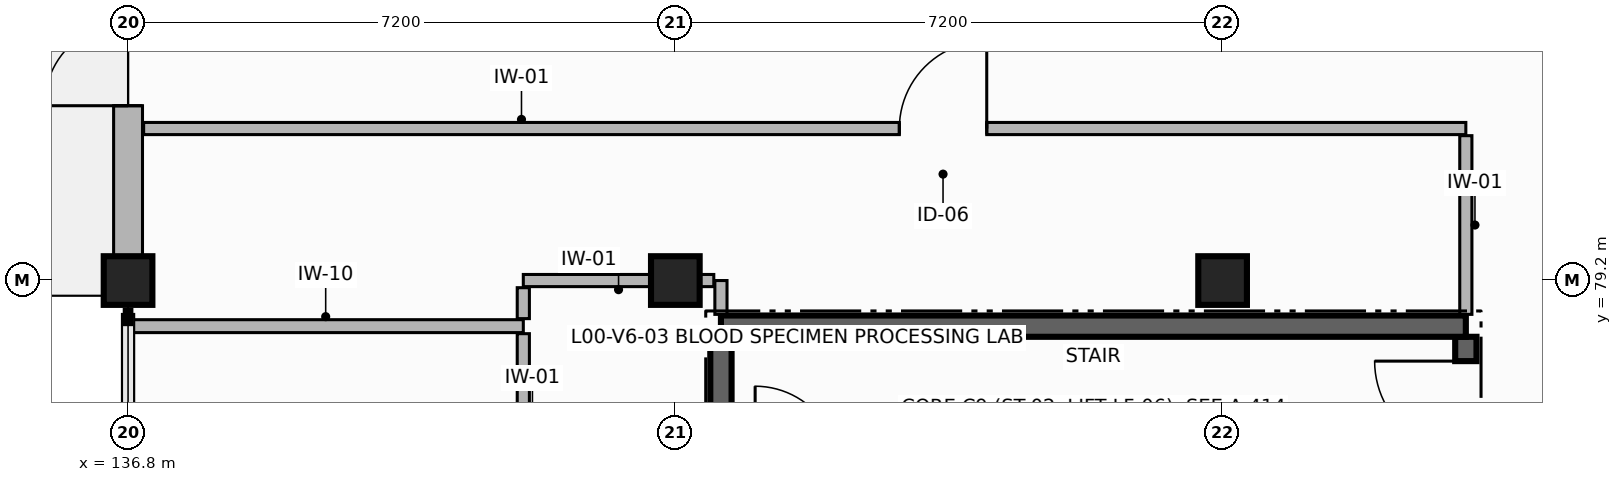
"""IFC4 building model, lengths in metres.
Left out: names, types, materials, properties, quantities, classifications, styles, units other than length and angle.
Written with IfcOpenShell. Run it as: python <this file> out.ifc"""

import sys

from ifc_helpers import new_model, si_unit, direction, frame, frame_2d, origin, origin_2d, place, context, subcontext, project, spatial, rectangle, extrude, element, fill, save


model = new_model("IFC4")
c1 = context("Model", 3, precision=1e-05, world=origin(), true_north=direction((0.0, 1.0)))
c2 = subcontext(c1, "Body", "Model", "MODEL_VIEW")
j1 = project(units=[si_unit("LENGTHUNIT", "METRE"), si_unit("PLANEANGLEUNIT", "RADIAN")], contexts=[c1])
p1 = place(None, origin())
s1 = spatial("IfcSite", under=j1, at=p1, CompositionType="ELEMENT")
p2 = place(p1, origin())
s2 = spatial("IfcBuilding", under=s1, at=p2, CompositionType="ELEMENT")
p3 = place(p2, origin())
s3 = spatial("IfcBuildingStorey", under=s2, at=p3, CompositionType="ELEMENT", Elevation=0.0)
for number, where, z_axis, x_axis in (
    (1, (136.8, 79.2, -0.38), (0.0, 0.0, 1.0), (1.0, 0.0, 0.0)),
    (2, (144.0, 79.2, -0.38), (0.0, 0.0, 1.0), (1.0, 0.0, 0.0)),
    (3, (151.2, 79.2, -0.38), (0.0, 0.0, 1.0), (1.0, 0.0, 0.0)),
):
    element("IfcColumn", number, at=place(p3, frame(where, z_axis=z_axis, x_axis=x_axis)), inside=s3, PredefinedType="COLUMN", context=c2, shape_type="SweptSolid", body=[
        extrude(rectangle(XDim=0.64, YDim=0.64, at=origin_2d()), origin(), (0.0, 0.0, 1.0), 4.56),
    ])
p4 = place(p3, frame((136.8, 86.4, 0.0), z_axis=(0.0, 0.0, 1.0), x_axis=(0.0, -1.0, 0.0)))
e4 = element("IfcWall", 4, at=p4, inside=s3, PredefinedType="SOLIDWALL", context=c2, shape_type="SweptSolid", body=[
    extrude(rectangle(XDim=7.2, YDim=0.38, at=frame_2d((3.6, 0.0))), origin(), (0.0, 0.0, 1.0), 3.51),
])
p5 = place(p4, frame((2.7, 0.0, 0.0)))
e5 = element("IfcOpeningElement", 5, at=p5, cuts=e4, PredefinedType="OPENING", context=c2, shape_type="SweptSolid", body=[
    extrude(rectangle(XDim=2.2, YDim=2.6, at=frame_2d((1.1, 1.3))), frame((0.0, 0.2, 0.0), z_axis=(0.0, -1.0, 0.0), x_axis=(1.0, 0.0, 0.0)), (0.0, 0.0, 1.0), 0.4),
])
p6 = place(p3, frame((154.4, 72.94, 0.0), z_axis=(0.0, 0.0, 1.0), x_axis=(0.0, 1.0, 0.0)))
e6 = element("IfcWall", 6, at=p6, inside=s3, PredefinedType="SHEAR", context=c2, shape_type="SweptSolid", body=[
    extrude(rectangle(XDim=5.52, YDim=0.28, at=frame_2d((2.76, 0.0))), origin(), (0.0, 0.0, 1.0), 4.18),
])
p7 = place(p6, frame((4.0, 0.0, 0.0)))
e7 = element("IfcOpeningElement", 7, at=p7, cuts=e6, PredefinedType="OPENING", context=c2, shape_type="SweptSolid", body=[
    extrude(rectangle(XDim=1.2, YDim=2.25, at=frame_2d((0.6, 1.125))), frame((0.0, 0.15, 0.0), z_axis=(0.0, -1.0, 0.0), x_axis=(1.0, 0.0, 0.0)), (0.0, 0.0, 1.0), 0.3),
])
p8 = place(p3, frame((154.4, 78.6, 0.0), z_axis=(0.0, 0.0, 1.0), x_axis=(-1.0, 0.0, 0.0)))
e8 = element("IfcWall", 8, at=p8, inside=s3, PredefinedType="SHEAR", context=c2, shape_type="SweptSolid", body=[
    extrude(rectangle(XDim=9.8, YDim=0.28, at=frame_2d((4.9, 0.0))), origin(), (0.0, 0.0, 1.0), 4.18),
])
p9 = place(p3, frame((144.6, 78.46, 0.0), z_axis=(0.0, 0.0, 1.0), x_axis=(0.0, -1.0, 0.0)))
e9 = element("IfcWall", 9, at=p9, inside=s3, PredefinedType="SHEAR", context=c2, shape_type="SweptSolid", body=[
    extrude(rectangle(XDim=5.52, YDim=0.28, at=frame_2d((2.76, 0.0))), origin(), (0.0, 0.0, 1.0), 4.18),
])
p10 = place(p3, frame((136.8, 78.6, 0.0), z_axis=(0.0, 0.0, 1.0), x_axis=(1.0, 0.0, 0.0)))
e10 = element("IfcWall", 10, at=p10, inside=s3, PredefinedType="PARTITIONING", context=c2, shape_type="SweptSolid", body=[
    extrude(rectangle(XDim=5.2, YDim=0.17, at=frame_2d((2.6, 0.0))), origin(), (0.0, 0.0, 1.0), 3.49),
])
p11 = place(p3, frame((142.0, 78.501, 0.0), z_axis=(0.0, 0.0, 1.0), x_axis=(0.0, -1.0, 0.0)))
e11 = element("IfcWall", 11, at=p11, inside=s3, PredefinedType="PARTITIONING", context=c2, shape_type="SweptSolid", body=[
    extrude(rectangle(XDim=5.701, YDim=0.16, at=frame_2d((2.851, 0.0))), origin(), (0.0, 0.0, 1.0), 3.49),
])
p12 = place(p11, frame((2.262, 0.0, 0.0)))
e12 = element("IfcOpeningElement", 12, at=p12, cuts=e11, PredefinedType="OPENING", context=c2, shape_type="SweptSolid", body=[
    extrude(rectangle(XDim=1.4, YDim=2.3, at=frame_2d((0.7, 1.15))), frame((0.0, 0.09, 0.0), z_axis=(0.0, -1.0, 0.0), x_axis=(1.0, 0.0, 0.0)), (0.0, 0.0, 1.0), 0.18),
])
p13 = place(p3, frame((144.6, 78.755, 0.0), z_axis=(0.0, 0.0, 1.0), x_axis=(0.0, 1.0, 0.0)))
e13 = element("IfcWall", 13, at=p13, inside=s3, PredefinedType="PARTITIONING", context=c2, shape_type="SweptSolid", body=[
    extrude(rectangle(XDim=0.445, YDim=0.16, at=frame_2d((0.223, 0.0))), origin(), (0.0, 0.0, 1.0), 3.49),
])
p14 = place(p3, frame((144.506, 79.2, 0.0), z_axis=(0.0, 0.0, 1.0), x_axis=(-1.0, 0.0, 0.0)))
e14 = element("IfcWall", 14, at=p14, inside=s3, PredefinedType="PARTITIONING", context=c2, shape_type="SweptSolid", body=[
    extrude(rectangle(XDim=2.506, YDim=0.16, at=frame_2d((1.253, 0.0))), origin(), (0.0, 0.0, 1.0), 3.49),
])
p15 = place(p3, frame((142.0, 79.106, 0.0), z_axis=(0.0, 0.0, 1.0), x_axis=(0.0, -1.0, 0.0)))
e15 = element("IfcWall", 15, at=p15, inside=s3, PredefinedType="PARTITIONING", context=c2, shape_type="SweptSolid", body=[
    extrude(rectangle(XDim=0.407, YDim=0.16, at=frame_2d((0.204, 0.0))), origin(), (0.0, 0.0, 1.0), 3.49),
])
p16 = place(p3, frame((137.005, 81.2, 0.0), z_axis=(0.0, 0.0, 1.0), x_axis=(1.0, 0.0, 0.0)))
e16 = element("IfcWall", 16, at=p16, inside=s3, PredefinedType="PARTITIONING", context=c2, shape_type="SweptSolid", body=[
    extrude(rectangle(XDim=17.395, YDim=0.16, at=frame_2d((8.698, 0.0))), origin(), (0.0, 0.0, 1.0), 3.49),
])
p17 = place(p16, frame((9.942, 0.0, 0.0)))
e17 = element("IfcOpeningElement", 17, at=p17, cuts=e16, PredefinedType="OPENING", context=c2, shape_type="SweptSolid", body=[
    extrude(rectangle(XDim=1.15, YDim=2.25, at=frame_2d((0.575, 1.125))), frame((0.0, 0.09, 0.0), z_axis=(0.0, -1.0, 0.0), x_axis=(1.0, 0.0, 0.0)), (0.0, 0.0, 1.0), 0.18),
])
p18 = place(p3, frame((154.4, 81.106, 0.0), z_axis=(0.0, 0.0, 1.0), x_axis=(0.0, -1.0, 0.0)))
e18 = element("IfcWall", 18, at=p18, inside=s3, PredefinedType="PARTITIONING", context=c2, shape_type="SweptSolid", body=[
    extrude(rectangle(XDim=2.351, YDim=0.16, at=frame_2d((1.176, 0.0))), origin(), (0.0, 0.0, 1.0), 3.49),
])
p19 = place(p5, frame((2.2, 0.0, 0.0), z_axis=(0.0, 0.0, 1.0), x_axis=(-1.0, 0.0, 0.0)))
e19 = element("IfcDoor", 19, at=p19, inside=s3, OperationType="DOUBLE_DOOR_SINGLE_SWING", PredefinedType="DOOR", context=c2, shape_type="SweptSolid", body=[
    extrude(rectangle(XDim=2.2, YDim=2.6, at=frame_2d((1.1, 1.3))), frame((0.0, 0.025, 0.0), z_axis=(0.0, -1.0, 0.0), x_axis=(1.0, 0.0, 0.0)), (0.0, 0.0, 1.0), 0.05),
])
fill(e5, e19)
p20 = place(p7, origin())
e20 = element("IfcDoor", 20, at=p20, inside=s3, OperationType="SINGLE_SWING_RIGHT", PredefinedType="DOOR", context=c2, shape_type="SweptSolid", body=[
    extrude(rectangle(XDim=1.2, YDim=2.25, at=frame_2d((0.6, 1.125))), frame((0.0, 0.025, 0.0), z_axis=(0.0, -1.0, 0.0), x_axis=(1.0, 0.0, 0.0)), (0.0, 0.0, 1.0), 0.05),
])
fill(e7, e20)
p21 = place(p17, origin())
e21 = element("IfcDoor", 21, at=p21, inside=s3, OperationType="SINGLE_SWING_RIGHT", PredefinedType="DOOR", context=c2, shape_type="SweptSolid", body=[
    extrude(rectangle(XDim=1.15, YDim=2.25, at=frame_2d((0.575, 1.125))), frame((0.0, 0.025, 0.0), z_axis=(0.0, -1.0, 0.0), x_axis=(1.0, 0.0, 0.0)), (0.0, 0.0, 1.0), 0.05),
])
fill(e17, e21)
save(model, sys.argv[1])
